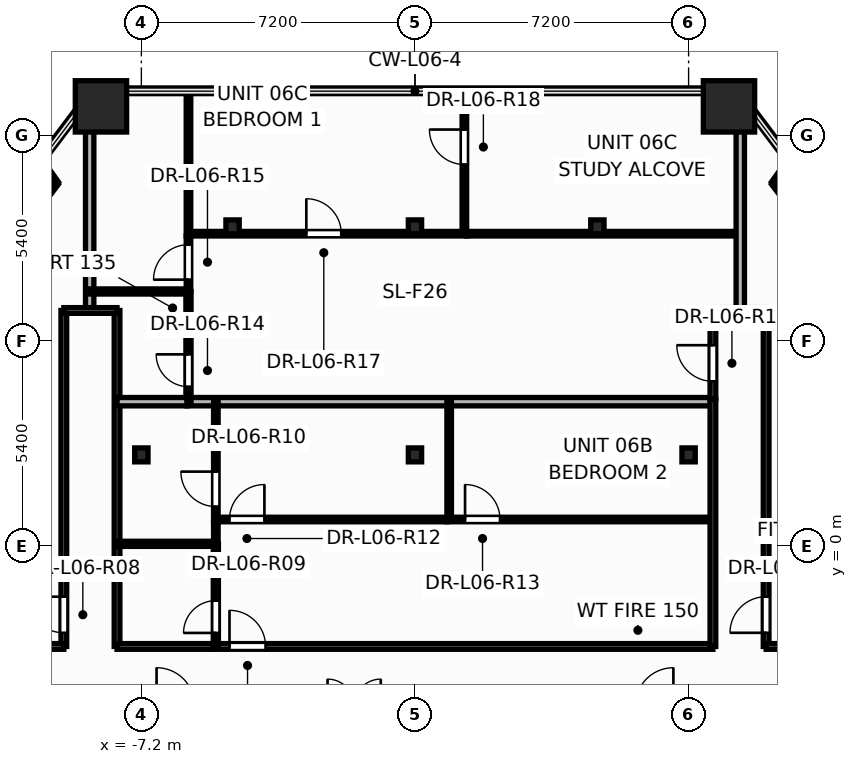
"""IFC4 building model, lengths in metres.
Left out: names, types, materials, properties, quantities, classifications, styles, units other than length and angle.
Written with IfcOpenShell. Run it as: python <this file> out.ifc"""

import sys

from ifc_helpers import new_model, si_unit, direction, frame, frame_2d, origin, origin_2d, place, context, subcontext, project, spatial, rectangle, hollow_rectangle, i_section, extrude, element, fill, save


model = new_model("IFC4")
c1 = context("Model", 3, precision=1e-05, world=origin(), true_north=direction((0.0, 1.0)))
c2 = subcontext(c1, "Body", "Model", "MODEL_VIEW")
j1 = project(units=[si_unit("LENGTHUNIT", "METRE"), si_unit("PLANEANGLEUNIT", "RADIAN")], contexts=[c1])
p1 = place(None, origin())
s1 = spatial("IfcSite", under=j1, at=p1, CompositionType="ELEMENT")
p2 = place(p1, origin())
s2 = spatial("IfcBuilding", under=s1, at=p2, CompositionType="ELEMENT")
p3 = place(p2, frame((0.0, 0.0, 27.9)))
s3 = spatial("IfcBuildingStorey", under=s2, at=p3, CompositionType="ELEMENT", Elevation=27.9)
for number, where, z_axis, x_axis in (
    (1, (8.263, 11.57, 0.0), (0.0, 0.0, 1.0), (1.0, 0.0, 0.0)),
    (2, (-8.263, 11.57, 0.0), (0.0, 0.0, 1.0), (1.0, 0.0, 0.0)),
):
    element("IfcColumn", number, at=place(p3, frame(where, z_axis=z_axis, x_axis=x_axis)), inside=s3, PredefinedType="COLUMN", context=c2, shape_type="SweptSolid", body=[
        extrude(hollow_rectangle(XDim=1.35, YDim=1.35, WallThickness=0.065, at=origin_2d()), origin(), (0.0, 0.0, 1.0), 3.6),
    ])
for number, where, z_axis, x_axis in (
    (3, (-7.2, 2.4, 0.0), (0.0, 0.0, 1.0), (1.0, 0.0, 0.0)),
    (4, (0.0, 2.4, 0.0), (0.0, 0.0, 1.0), (1.0, 0.0, 0.0)),
    (5, (7.2, 2.4, 0.0), (0.0, 0.0, 1.0), (1.0, 0.0, 0.0)),
    (6, (-4.8, 8.4, 0.0), (0.0, 0.0, 1.0), (1.0, 0.0, 0.0)),
    (7, (0.0, 8.4, 0.0), (0.0, 0.0, 1.0), (1.0, 0.0, 0.0)),
    (8, (4.8, 8.4, 0.0), (0.0, 0.0, 1.0), (1.0, 0.0, 0.0)),
):
    element("IfcColumn", number, at=place(p3, frame(where, z_axis=z_axis, x_axis=x_axis)), inside=s3, PredefinedType="COLUMN", context=c2, shape_type="SweptSolid", body=[
        extrude(i_section(OverallWidth=0.35, OverallDepth=0.367, WebThickness=0.025, FlangeThickness=0.032, at=origin_2d()), origin(), (0.0, 0.0, 1.0), 3.6),
    ])
p4 = place(p3, frame((-5.32, -2.64, 0.0), z_axis=(0.0, 0.0, 1.0), x_axis=(1.0, 0.0, 0.0)))
e9 = element("IfcWall", 9, at=p4, inside=s3, PredefinedType="PARTITIONING", context=c2, shape_type="SweptSolid", body=[
    extrude(rectangle(XDim=13.16, YDim=0.15, at=frame_2d((6.58, 0.0))), origin(), (0.0, 0.0, 1.0), 2.325),
])
p5 = place(p4, frame((0.439, 0.0, 0.0)))
e10 = element("IfcOpeningElement", 10, at=p5, cuts=e9, PredefinedType="OPENING", context=c2, shape_type="SweptSolid", body=[
    extrude(rectangle(XDim=0.956, YDim=2.104, at=frame_2d((0.475, 1.052))), frame((0.0, 0.085, 0.0), z_axis=(0.0, -1.0, 0.0), x_axis=(1.0, 0.0, 0.0)), (0.0, 0.0, 1.0), 0.17),
])
p6 = place(p3, frame((-9.24, -2.64, 0.0), z_axis=(0.0, 0.0, 1.0), x_axis=(0.0, 1.0, 0.0)))
e11 = element("IfcWall", 11, at=p6, inside=s3, PredefinedType="PARTITIONING", context=c2, shape_type="SweptSolid", body=[
    extrude(rectangle(XDim=8.84, YDim=0.15, at=frame_2d((4.42, 0.0))), origin(), (0.0, 0.0, 1.0), 2.509),
])
p7 = place(p6, frame((0.359, 0.0, 0.0)))
e12 = element("IfcOpeningElement", 12, at=p7, cuts=e11, PredefinedType="OPENING", context=c2, shape_type="SweptSolid", body=[
    extrude(rectangle(XDim=0.956, YDim=2.104, at=frame_2d((0.475, 1.052))), frame((0.0, 0.085, 0.0), z_axis=(0.0, -1.0, 0.0), x_axis=(1.0, 0.0, 0.0)), (0.0, 0.0, 1.0), 0.17),
])
p8 = place(p3, frame((9.24, -2.64, 0.0), z_axis=(0.0, 0.0, 1.0), x_axis=(0.0, 1.0, 0.0)))
e13 = element("IfcWall", 13, at=p8, inside=s3, PredefinedType="PARTITIONING", context=c2, shape_type="SweptSolid", body=[
    extrude(rectangle(XDim=8.84, YDim=0.15, at=frame_2d((4.42, 0.0))), origin(), (0.0, 0.0, 1.0), 2.509),
])
p9 = place(p8, frame((0.359, 0.0, 0.0)))
e14 = element("IfcOpeningElement", 14, at=p9, cuts=e13, PredefinedType="OPENING", context=c2, shape_type="SweptSolid", body=[
    extrude(rectangle(XDim=0.956, YDim=2.104, at=frame_2d((0.475, 1.052))), frame((0.0, 0.085, 0.0), z_axis=(0.0, -1.0, 0.0), x_axis=(1.0, 0.0, 0.0)), (0.0, 0.0, 1.0), 0.17),
])
p10 = place(p3, frame((-5.96, 8.22, 0.0), z_axis=(0.0, 0.0, 1.0), x_axis=(1.0, 0.0, 0.0)))
e15 = element("IfcWall", 15, at=p10, inside=s3, PredefinedType="PARTITIONING", context=c2, shape_type="SweptSolid", body=[
    extrude(rectangle(XDim=7.32, YDim=0.12, at=frame_2d((3.66, 0.0))), origin(), (0.0, 0.0, 1.0), 2.325),
])
p11 = place(p10, frame((3.101, 0.0, 0.0)))
e16 = element("IfcOpeningElement", 16, at=p11, cuts=e15, PredefinedType="OPENING", context=c2, shape_type="SweptSolid", body=[
    extrude(rectangle(XDim=0.926, YDim=2.104, at=frame_2d((0.46, 1.052))), frame((0.0, 0.07, 0.0), z_axis=(0.0, -1.0, 0.0), x_axis=(1.0, 0.0, 0.0)), (0.0, 0.0, 1.0), 0.14),
])
p12 = place(p3, frame((1.362, 8.22, 0.0), z_axis=(0.0, 0.0, 1.0), x_axis=(1.0, 0.0, 0.0)))
e17 = element("IfcWall", 17, at=p12, inside=s3, PredefinedType="PARTITIONING", context=c2, shape_type="SweptSolid", body=[
    extrude(rectangle(XDim=7.198, YDim=0.12, at=frame_2d((3.599, 0.0))), origin(), (0.0, 0.0, 1.0), 2.509),
])
p13 = place(p3, frame((0.84, 0.7, 0.0), z_axis=(0.0, 0.0, 1.0), x_axis=(1.0, 0.0, 0.0)))
e18 = element("IfcWall", 18, at=p13, inside=s3, PredefinedType="PARTITIONING", context=c2, shape_type="SweptSolid", body=[
    extrude(rectangle(XDim=7.0, YDim=0.12, at=frame_2d((3.5, 0.0))), origin(), (0.0, 0.0, 1.0), 2.325),
])
p14 = place(p13, frame((0.478, 0.0, 0.0)))
e19 = element("IfcOpeningElement", 19, at=p14, cuts=e18, PredefinedType="OPENING", context=c2, shape_type="SweptSolid", body=[
    extrude(rectangle(XDim=0.926, YDim=2.104, at=frame_2d((0.46, 1.052))), frame((0.0, 0.07, 0.0), z_axis=(0.0, -1.0, 0.0), x_axis=(1.0, 0.0, 0.0)), (0.0, 0.0, 1.0), 0.14),
])
p15 = place(p3, frame((-6.0, 3.8, 0.0), z_axis=(0.0, 0.0, 1.0), x_axis=(1.0, 0.0, 0.0)))
e20 = element("IfcWall", 20, at=p15, inside=s3, PredefinedType="PARTITIONING", context=c2, shape_type="SweptSolid", body=[
    extrude(rectangle(XDim=13.84, YDim=0.22, at=frame_2d((6.92, 0.0))), origin(), (0.0, 0.0, 1.0), 2.325),
])
p16 = place(p3, frame((-5.24, 0.7, 0.0), z_axis=(0.0, 0.0, 1.0), x_axis=(1.0, 0.0, 0.0)))
e21 = element("IfcWall", 21, at=p16, inside=s3, PredefinedType="PARTITIONING", context=c2, shape_type="SweptSolid", body=[
    extrude(rectangle(XDim=6.078, YDim=0.12, at=frame_2d((3.039, 0.0))), origin(), (0.0, 0.0, 1.0), 2.325),
])
p17 = place(p16, frame((0.358, 0.0, 0.0)))
e22 = element("IfcOpeningElement", 22, at=p17, cuts=e21, PredefinedType="OPENING", context=c2, shape_type="SweptSolid", body=[
    extrude(rectangle(XDim=0.926, YDim=2.104, at=frame_2d((0.46, 1.052))), frame((0.0, 0.07, 0.0), z_axis=(0.0, -1.0, 0.0), x_axis=(1.0, 0.0, 0.0)), (0.0, 0.0, 1.0), 0.14),
])
p18 = place(p3, frame((-14.64, -2.64, 0.0), z_axis=(0.0, 0.0, 1.0), x_axis=(1.0, 0.0, 0.0)))
e23 = element("IfcWall", 23, at=p18, inside=s3, PredefinedType="PARTITIONING", context=c2, shape_type="SweptSolid", body=[
    extrude(rectangle(XDim=5.4, YDim=0.15, at=frame_2d((2.7, 0.0))), origin(), (0.0, 0.0, 1.0), 3.35),
])
p19 = place(p3, frame((-8.56, 6.2, 0.0), z_axis=(0.0, 0.0, 1.0), x_axis=(0.0, 1.0, 0.0)))
e24 = element("IfcWall", 24, at=p19, inside=s3, PredefinedType="PARTITIONING", context=c2, shape_type="SweptSolid", body=[
    extrude(rectangle(XDim=5.641, YDim=0.22, at=frame_2d((2.821, 0.0))), origin(), (0.0, 0.0, 1.0), 2.509),
])
p20 = place(p3, frame((-7.84, -2.64, 0.0), z_axis=(0.0, 0.0, 1.0), x_axis=(0.0, 1.0, 0.0)))
e25 = element("IfcWall", 25, at=p20, inside=s3, PredefinedType="PARTITIONING", context=c2, shape_type="SweptSolid", body=[
    extrude(rectangle(XDim=8.84, YDim=0.15, at=frame_2d((4.42, 0.0))), origin(), (0.0, 0.0, 1.0), 2.509),
])
p21 = place(p3, frame((-5.96, 8.16, 0.0), z_axis=(0.0, 0.0, 1.0), x_axis=(0.0, 1.0, 0.0)))
e26 = element("IfcWall", 26, at=p21, inside=s3, PredefinedType="PARTITIONING", context=c2, shape_type="SweptSolid", body=[
    extrude(rectangle(XDim=3.811, YDim=0.12, at=frame_2d((1.905, 0.0))), origin(), (0.0, 0.0, 1.0), 2.509),
])
p22 = place(p3, frame((1.3, 8.22, 0.0), z_axis=(0.0, 0.0, 1.0), x_axis=(0.0, 1.0, 0.0)))
e27 = element("IfcWall", 27, at=p22, inside=s3, PredefinedType="PARTITIONING", context=c2, shape_type="SweptSolid", body=[
    extrude(rectangle(XDim=3.75, YDim=0.12, at=frame_2d((1.875, 0.0))), origin(), (0.0, 0.0, 1.0), 2.509),
])
p23 = place(p22, frame((1.821, 0.0, 0.0)))
e28 = element("IfcOpeningElement", 28, at=p23, cuts=e27, PredefinedType="OPENING", context=c2, shape_type="SweptSolid", body=[
    extrude(rectangle(XDim=0.926, YDim=2.104, at=frame_2d((0.46, 1.052))), frame((0.0, 0.07, 0.0), z_axis=(0.0, -1.0, 0.0), x_axis=(1.0, 0.0, 0.0)), (0.0, 0.0, 1.0), 0.14),
])
p24 = place(p3, frame((8.56, 6.2, 0.0), z_axis=(0.0, 0.0, 1.0), x_axis=(0.0, 1.0, 0.0)))
e29 = element("IfcWall", 29, at=p24, inside=s3, PredefinedType="PARTITIONING", context=c2, shape_type="SweptSolid", body=[
    extrude(rectangle(XDim=5.641, YDim=0.22, at=frame_2d((2.821, 0.0))), origin(), (0.0, 0.0, 1.0), 2.509),
])
p25 = place(p3, frame((7.84, -2.64, 0.0), z_axis=(0.0, 0.0, 1.0), x_axis=(0.0, 1.0, 0.0)))
e30 = element("IfcWall", 30, at=p25, inside=s3, PredefinedType="PARTITIONING", context=c2, shape_type="SweptSolid", body=[
    extrude(rectangle(XDim=6.5, YDim=0.15, at=frame_2d((3.25, 0.0))), origin(), (0.0, 0.0, 1.0), 2.509),
])
p26 = place(p3, frame((9.24, -2.64, 0.0), z_axis=(0.0, 0.0, 1.0), x_axis=(1.0, 0.0, 0.0)))
e31 = element("IfcWall", 31, at=p26, inside=s3, PredefinedType="PARTITIONING", context=c2, shape_type="SweptSolid", body=[
    extrude(rectangle(XDim=3.26, YDim=0.15, at=frame_2d((1.63, 0.0))), origin(), (0.0, 0.0, 1.0), 3.35),
])
p27 = place(p3, frame((-5.24, 0.64, 0.0), z_axis=(0.0, 0.0, 1.0), x_axis=(0.0, 1.0, 0.0)))
e32 = element("IfcWall", 32, at=p27, inside=s3, PredefinedType="PARTITIONING", context=c2, shape_type="SweptSolid", body=[
    extrude(rectangle(XDim=3.16, YDim=0.12, at=frame_2d((1.58, 0.0))), origin(), (0.0, 0.0, 1.0), 2.325),
])
p28 = place(p27, frame((0.4, 0.0, 0.0)))
e33 = element("IfcOpeningElement", 33, at=p28, cuts=e32, PredefinedType="OPENING", context=c2, shape_type="SweptSolid", body=[
    extrude(rectangle(XDim=0.926, YDim=2.104, at=frame_2d((0.46, 1.052))), frame((0.0, 0.07, 0.0), z_axis=(0.0, -1.0, 0.0), x_axis=(1.0, 0.0, 0.0)), (0.0, 0.0, 1.0), 0.14),
])
p29 = place(p3, frame((0.9, 0.7, 0.0), z_axis=(0.0, 0.0, 1.0), x_axis=(0.0, 1.0, 0.0)))
e34 = element("IfcWall", 34, at=p29, inside=s3, PredefinedType="PARTITIONING", context=c2, shape_type="SweptSolid", body=[
    extrude(rectangle(XDim=3.1, YDim=0.12, at=frame_2d((1.55, 0.0))), origin(), (0.0, 0.0, 1.0), 2.325),
])
p30 = place(p3, frame((-5.96, 3.8, 0.0), z_axis=(0.0, 0.0, 1.0), x_axis=(0.0, 1.0, 0.0)))
e35 = element("IfcWall", 35, at=p30, inside=s3, PredefinedType="PARTITIONING", context=c2, shape_type="SweptSolid", body=[
    extrude(rectangle(XDim=2.9, YDim=0.135, at=frame_2d((1.45, 0.0))), origin(), (0.0, 0.0, 1.0), 2.509),
])
p31 = place(p30, frame((0.396, 0.0, 0.0)))
e36 = element("IfcOpeningElement", 36, at=p31, cuts=e35, PredefinedType="OPENING", context=c2, shape_type="SweptSolid", body=[
    extrude(rectangle(XDim=0.856, YDim=2.104, at=frame_2d((0.425, 1.052))), frame((0.0, 0.078, 0.0), z_axis=(0.0, -1.0, 0.0), x_axis=(1.0, 0.0, 0.0)), (0.0, 0.0, 1.0), 0.155),
])
p32 = place(p3, frame((-5.24, -2.64, 0.0), z_axis=(0.0, 0.0, 1.0), x_axis=(0.0, 1.0, 0.0)))
e37 = element("IfcWall", 37, at=p32, inside=s3, PredefinedType="PARTITIONING", context=c2, shape_type="SweptSolid", body=[
    extrude(rectangle(XDim=2.7, YDim=0.135, at=frame_2d((1.35, 0.0))), origin(), (0.0, 0.0, 1.0), 3.35),
])
p33 = place(p32, frame((0.356, 0.0, 0.0)))
e38 = element("IfcOpeningElement", 38, at=p33, cuts=e37, PredefinedType="OPENING", context=c2, shape_type="SweptSolid", body=[
    extrude(rectangle(XDim=0.856, YDim=2.104, at=frame_2d((0.425, 1.052))), frame((0.0, 0.078, 0.0), z_axis=(0.0, -1.0, 0.0), x_axis=(1.0, 0.0, 0.0)), (0.0, 0.0, 1.0), 0.155),
])
p34 = place(p3, frame((-7.84, -2.64, 0.0), z_axis=(0.0, 0.0, 1.0), x_axis=(1.0, 0.0, 0.0)))
e39 = element("IfcWall", 39, at=p34, inside=s3, PredefinedType="PARTITIONING", context=c2, shape_type="SweptSolid", body=[
    extrude(rectangle(XDim=2.518, YDim=0.15, at=frame_2d((1.259, 0.0))), origin(), (0.0, 0.0, 1.0), 2.325),
])
p35 = place(p3, frame((-8.56, 6.7, 0.0), z_axis=(0.0, 0.0, 1.0), x_axis=(1.0, 0.0, 0.0)))
e40 = element("IfcWall", 40, at=p35, inside=s3, PredefinedType="PARTITIONING", context=c2, shape_type="SweptSolid", body=[
    extrude(rectangle(XDim=2.6, YDim=0.135, at=frame_2d((1.3, 0.0))), origin(), (0.0, 0.0, 1.0), 2.509),
])
p36 = place(p3, frame((-7.84, 0.06, 0.0), z_axis=(0.0, 0.0, 1.0), x_axis=(1.0, 0.0, 0.0)))
e41 = element("IfcWall", 41, at=p36, inside=s3, PredefinedType="PARTITIONING", context=c2, shape_type="SweptSolid", body=[
    extrude(rectangle(XDim=2.6, YDim=0.135, at=frame_2d((1.3, 0.0))), origin(), (0.0, 0.0, 1.0), 2.325),
])
p37 = place(p3, frame((7.84, 3.862, 0.0), z_axis=(0.0, 0.0, 1.0), x_axis=(0.0, 1.0, 0.0)))
e42 = element("IfcWall", 42, at=p37, inside=s3, PredefinedType="PARTITIONING", context=c2, shape_type="SweptSolid", body=[
    extrude(rectangle(XDim=2.338, YDim=0.15, at=frame_2d((1.169, 0.0))), origin(), (0.0, 0.0, 1.0), 3.35),
])
p38 = place(p37, frame((0.474, 0.0, 0.0)))
e43 = element("IfcOpeningElement", 43, at=p38, cuts=e42, PredefinedType="OPENING", context=c2, shape_type="SweptSolid", body=[
    extrude(rectangle(XDim=0.956, YDim=2.104, at=frame_2d((0.475, 1.052))), frame((0.0, 0.085, 0.0), z_axis=(0.0, -1.0, 0.0), x_axis=(1.0, 0.0, 0.0)), (0.0, 0.0, 1.0), 0.17),
])
for number, where, z_axis, x_axis in (
    (44, (-9.434, 9.551, 0.0), (0.0, 0.0, 1.0), (-0.602, -0.799, 0.0)),
    (45, (10.746, 7.81, 0.0), (0.0, 0.0, 1.0), (-0.602, 0.799, 0.0)),
):
    element("IfcWall", number, at=place(p3, frame(where, z_axis=z_axis, x_axis=x_axis)), inside=s3, PredefinedType="PARTITIONING", context=c2, shape_type="SweptSolid", body=[
        extrude(rectangle(XDim=2.18, YDim=0.12, at=frame_2d((1.09, 0.0))), origin(), (0.0, 0.0, 1.0), 3.35),
    ])
p39 = place(p3, frame((-7.84, 3.8, 0.0), z_axis=(0.0, 0.0, 1.0), x_axis=(1.0, 0.0, 0.0)))
e46 = element("IfcWall", 46, at=p39, inside=s3, PredefinedType="PARTITIONING", context=c2, shape_type="SweptSolid", body=[
    extrude(rectangle(XDim=1.838, YDim=0.22, at=frame_2d((0.919, 0.0))), origin(), (0.0, 0.0, 1.0), 2.509),
])
p40 = place(p3, frame((-5.96, 6.7, 0.0), z_axis=(0.0, 0.0, 1.0), x_axis=(0.0, 1.0, 0.0)))
e47 = element("IfcWall", 47, at=p40, inside=s3, PredefinedType="PARTITIONING", context=c2, shape_type="SweptSolid", body=[
    extrude(rectangle(XDim=1.458, YDim=0.12, at=frame_2d((0.729, 0.0))), origin(), (0.0, 0.0, 1.0), 2.509),
])
p41 = place(p40, frame((0.311, 0.0, 0.0)))
e48 = element("IfcOpeningElement", 48, at=p41, cuts=e47, PredefinedType="OPENING", context=c2, shape_type="SweptSolid", body=[
    extrude(rectangle(XDim=0.926, YDim=2.104, at=frame_2d((0.46, 1.052))), frame((0.0, 0.07, 0.0), z_axis=(0.0, -1.0, 0.0), x_axis=(1.0, 0.0, 0.0)), (0.0, 0.0, 1.0), 0.14),
])
for number, where, z_axis, x_axis in (
    (49, (-9.24, 6.2, 0.0), (0.0, 0.0, 1.0), (1.0, 0.0, 0.0)),
    (50, (7.84, 6.2, 0.0), (0.0, 0.0, 1.0), (1.0, 0.0, 0.0)),
):
    element("IfcWall", number, at=place(p3, frame(where, z_axis=z_axis, x_axis=x_axis)), inside=s3, PredefinedType="PARTITIONING", context=c2, shape_type="SweptSolid", body=[
        extrude(rectangle(XDim=1.4, YDim=0.15, at=frame_2d((0.7, 0.0))), origin(), (0.0, 0.0, 1.0), 3.35),
    ])
for number, where, z_axis, x_axis in (
    (51, (-9.841, 10.125, 0.0), (0.0, 0.0, 1.0), (0.578, -0.816, 0.0)),
    (52, (9.434, 9.551, 0.0), (0.0, 0.0, 1.0), (0.578, 0.816, 0.0)),
):
    element("IfcWall", number, at=place(p3, frame(where, z_axis=z_axis, x_axis=x_axis)), inside=s3, PredefinedType="PARTITIONING", context=c2, shape_type="SweptSolid", body=[
        extrude(rectangle(XDim=0.703, YDim=0.12, at=frame_2d((0.352, 0.0))), origin(), (0.0, 0.0, 1.0), 2.713),
    ])
p42 = place(p3, frame((-5.24, 0.06, 0.0), z_axis=(0.0, 0.0, 1.0), x_axis=(0.0, 1.0, 0.0)))
e53 = element("IfcWall", 53, at=p42, inside=s3, PredefinedType="PARTITIONING", context=c2, shape_type="SweptSolid", body=[
    extrude(rectangle(XDim=0.578, YDim=0.12, at=frame_2d((0.289, 0.0))), origin(), (0.0, 0.0, 1.0), 3.35),
])
p43 = place(p7, origin())
e54 = element("IfcDoor", 54, at=p43, inside=s3, OperationType="SINGLE_SWING_RIGHT", PredefinedType="DOOR", context=c2, shape_type="SweptSolid", body=[
    extrude(rectangle(XDim=0.95, YDim=2.1, at=frame_2d((0.475, 1.05))), frame((0.0, 0.025, 0.0), z_axis=(0.0, -1.0, 0.0), x_axis=(1.0, 0.0, 0.0)), (0.0, 0.0, 1.0), 0.05),
])
fill(e12, e54)
p44 = place(p33, origin())
e55 = element("IfcDoor", 55, at=p44, inside=s3, OperationType="SINGLE_SWING_LEFT", PredefinedType="DOOR", context=c2, shape_type="SweptSolid", body=[
    extrude(rectangle(XDim=0.85, YDim=2.1, at=frame_2d((0.425, 1.05))), frame((0.0, 0.025, 0.0), z_axis=(0.0, -1.0, 0.0), x_axis=(1.0, 0.0, 0.0)), (0.0, 0.0, 1.0), 0.05),
])
fill(e38, e55)
p45 = place(p28, origin())
e56 = element("IfcDoor", 56, at=p45, inside=s3, OperationType="SINGLE_SWING_RIGHT", PredefinedType="DOOR", context=c2, shape_type="SweptSolid", body=[
    extrude(rectangle(XDim=0.92, YDim=2.1, at=frame_2d((0.46, 1.05))), frame((0.0, 0.025, 0.0), z_axis=(0.0, -1.0, 0.0), x_axis=(1.0, 0.0, 0.0)), (0.0, 0.0, 1.0), 0.05),
])
fill(e33, e56)
p46 = place(p5, origin())
e57 = element("IfcDoor", 57, at=p46, inside=s3, OperationType="SINGLE_SWING_LEFT", PredefinedType="DOOR", context=c2, shape_type="SweptSolid", body=[
    extrude(rectangle(XDim=0.95, YDim=2.1, at=frame_2d((0.475, 1.05))), frame((0.0, 0.025, 0.0), z_axis=(0.0, -1.0, 0.0), x_axis=(1.0, 0.0, 0.0)), (0.0, 0.0, 1.0), 0.05),
])
fill(e10, e57)
p47 = place(p17, origin())
e58 = element("IfcDoor", 58, at=p47, inside=s3, OperationType="SINGLE_SWING_RIGHT", PredefinedType="DOOR", context=c2, shape_type="SweptSolid", body=[
    extrude(rectangle(XDim=0.92, YDim=2.1, at=frame_2d((0.46, 1.05))), frame((0.0, 0.025, 0.0), z_axis=(0.0, -1.0, 0.0), x_axis=(1.0, 0.0, 0.0)), (0.0, 0.0, 1.0), 0.05),
])
fill(e22, e58)
p48 = place(p14, origin())
e59 = element("IfcDoor", 59, at=p48, inside=s3, OperationType="SINGLE_SWING_LEFT", PredefinedType="DOOR", context=c2, shape_type="SweptSolid", body=[
    extrude(rectangle(XDim=0.92, YDim=2.1, at=frame_2d((0.46, 1.05))), frame((0.0, 0.025, 0.0), z_axis=(0.0, -1.0, 0.0), x_axis=(1.0, 0.0, 0.0)), (0.0, 0.0, 1.0), 0.05),
])
fill(e19, e59)
p49 = place(p31, origin())
e60 = element("IfcDoor", 60, at=p49, inside=s3, OperationType="SINGLE_SWING_RIGHT", PredefinedType="DOOR", context=c2, shape_type="SweptSolid", body=[
    extrude(rectangle(XDim=0.85, YDim=2.1, at=frame_2d((0.425, 1.05))), frame((0.0, 0.025, 0.0), z_axis=(0.0, -1.0, 0.0), x_axis=(1.0, 0.0, 0.0)), (0.0, 0.0, 1.0), 0.05),
])
fill(e36, e60)
p50 = place(p41, origin())
e61 = element("IfcDoor", 61, at=p50, inside=s3, OperationType="SINGLE_SWING_LEFT", PredefinedType="DOOR", context=c2, shape_type="SweptSolid", body=[
    extrude(rectangle(XDim=0.92, YDim=2.1, at=frame_2d((0.46, 1.05))), frame((0.0, 0.025, 0.0), z_axis=(0.0, -1.0, 0.0), x_axis=(1.0, 0.0, 0.0)), (0.0, 0.0, 1.0), 0.05),
])
fill(e48, e61)
p51 = place(p38, origin())
e62 = element("IfcDoor", 62, at=p51, inside=s3, OperationType="SINGLE_SWING_RIGHT", PredefinedType="DOOR", context=c2, shape_type="SweptSolid", body=[
    extrude(rectangle(XDim=0.95, YDim=2.1, at=frame_2d((0.475, 1.05))), frame((0.0, 0.025, 0.0), z_axis=(0.0, -1.0, 0.0), x_axis=(1.0, 0.0, 0.0)), (0.0, 0.0, 1.0), 0.05),
])
fill(e43, e62)
p52 = place(p11, origin())
e63 = element("IfcDoor", 63, at=p52, inside=s3, OperationType="SINGLE_SWING_LEFT", PredefinedType="DOOR", context=c2, shape_type="SweptSolid", body=[
    extrude(rectangle(XDim=0.92, YDim=2.1, at=frame_2d((0.46, 1.05))), frame((0.0, 0.025, 0.0), z_axis=(0.0, -1.0, 0.0), x_axis=(1.0, 0.0, 0.0)), (0.0, 0.0, 1.0), 0.05),
])
fill(e16, e63)
p53 = place(p23, origin())
e64 = element("IfcDoor", 64, at=p53, inside=s3, OperationType="SINGLE_SWING_RIGHT", PredefinedType="DOOR", context=c2, shape_type="SweptSolid", body=[
    extrude(rectangle(XDim=0.92, YDim=2.1, at=frame_2d((0.46, 1.05))), frame((0.0, 0.025, 0.0), z_axis=(0.0, -1.0, 0.0), x_axis=(1.0, 0.0, 0.0)), (0.0, 0.0, 1.0), 0.05),
])
fill(e28, e64)
p54 = place(p9, origin())
e65 = element("IfcDoor", 65, at=p54, inside=s3, OperationType="SINGLE_SWING_LEFT", PredefinedType="DOOR", context=c2, shape_type="SweptSolid", body=[
    extrude(rectangle(XDim=0.95, YDim=2.1, at=frame_2d((0.475, 1.05))), frame((0.0, 0.025, 0.0), z_axis=(0.0, -1.0, 0.0), x_axis=(1.0, 0.0, 0.0)), (0.0, 0.0, 1.0), 0.05),
])
fill(e14, e65)
save(model, sys.argv[1])
